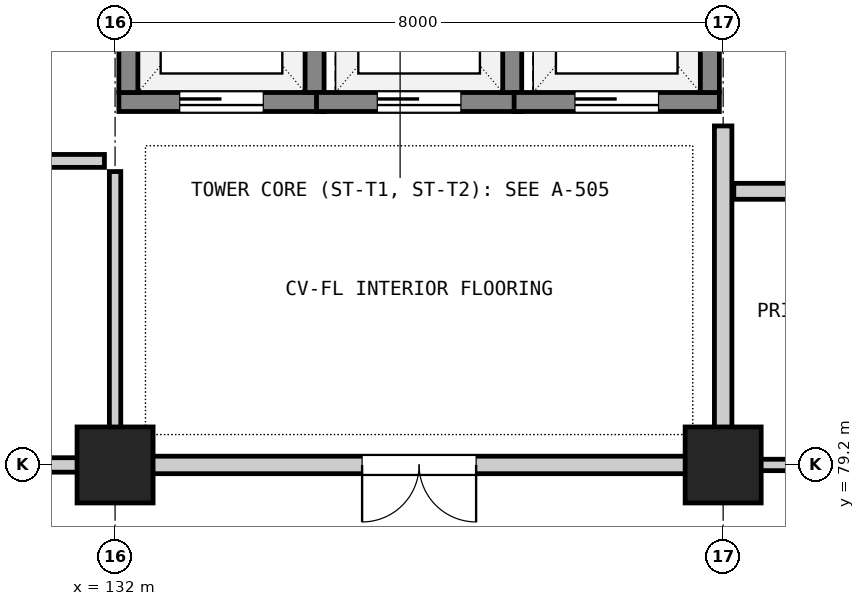
"""IFC4 building model, lengths in metres.
Left out: names, types, materials, properties, quantities, classifications, styles, units other than length and angle.
Written with IfcOpenShell. Run it as: python <this file> out.ifc"""

import sys

from ifc_helpers import new_model, si_unit, direction, frame, frame_2d, origin, origin_2d, place, context, subcontext, project, spatial, rectangle, extrude, element, fill, save


model = new_model("IFC4")
c1 = context("Model", 3, precision=1e-05, world=origin(), true_north=direction((0.0, 1.0)))
c2 = subcontext(c1, "Body", "Model", "MODEL_VIEW")
j1 = project(units=[si_unit("LENGTHUNIT", "METRE"), si_unit("PLANEANGLEUNIT", "RADIAN")], contexts=[c1])
p1 = place(None, origin())
s1 = spatial("IfcSite", under=j1, at=p1, CompositionType="ELEMENT")
p2 = place(p1, origin())
s2 = spatial("IfcBuilding", under=s1, at=p2, CompositionType="ELEMENT")
p3 = place(p2, frame((0.0, 0.0, 5.4)))
s3 = spatial("IfcBuildingStorey", under=s2, at=p3, CompositionType="ELEMENT", Elevation=5.4)
for number, where, z_axis, x_axis in (
    (1, (132.0, 79.2, 0.0), (0.0, 0.0, 1.0), (1.0, 0.0, 0.0)),
    (2, (140.0, 79.2, 0.0), (0.0, 0.0, 1.0), (1.0, 0.0, 0.0)),
):
    element("IfcColumn", number, at=place(p3, frame(where, z_axis=z_axis, x_axis=x_axis)), inside=s3, PredefinedType="COLUMN", context=c2, shape_type="SweptSolid", body=[
        extrude(rectangle(XDim=1.0, YDim=1.0, at=origin_2d()), origin(), (0.0, 0.0, 1.0), 5.4),
    ])
p4 = place(p3, frame((132.05, 83.975, 0.0), z_axis=(0.0, 0.0, 1.0), x_axis=(1.0, 0.0, 0.0)))
e3 = element("IfcWall", 3, at=p4, inside=s3, PredefinedType="SHEAR", context=c2, shape_type="SweptSolid", body=[
    extrude(rectangle(XDim=2.7, YDim=0.25, at=frame_2d((1.35, 0.0))), origin(), (0.0, 0.0, 1.0), 5.1),
])
p5 = place(p4, frame((0.8, 0.0, 0.0)))
e4 = element("IfcOpeningElement", 4, at=p5, cuts=e3, PredefinedType="OPENING", context=c2, shape_type="SweptSolid", body=[
    extrude(rectangle(XDim=1.1, YDim=2.15, at=frame_2d((0.55, 1.075))), frame((0.0, 0.137, 0.0), z_axis=(0.0, -1.0, 0.0), x_axis=(1.0, 0.0, 0.0)), (0.0, 0.0, 1.0), 0.274),
])
for number, where, z_axis, x_axis in (
    (5, (132.175, 84.1, 0.0), (0.0, 0.0, 1.0), (0.0, 1.0, 0.0)),
    (6, (134.625, 84.1, 0.0), (0.0, 0.0, 1.0), (0.0, 1.0, 0.0)),
):
    element("IfcWall", number, at=place(p3, frame(where, z_axis=z_axis, x_axis=x_axis)), inside=s3, PredefinedType="SHEAR", context=c2, shape_type="SweptSolid", body=[
        extrude(rectangle(XDim=2.6, YDim=0.25, at=frame_2d((1.3, 0.0))), origin(), (0.0, 0.0, 1.0), 5.1),
    ])
p6 = place(p3, frame((134.65, 83.975, 0.0), z_axis=(0.0, 0.0, 1.0), x_axis=(1.0, 0.0, 0.0)))
e7 = element("IfcWall", 7, at=p6, inside=s3, PredefinedType="SHEAR", context=c2, shape_type="SweptSolid", body=[
    extrude(rectangle(XDim=2.7, YDim=0.25, at=frame_2d((1.35, 0.0))), origin(), (0.0, 0.0, 1.0), 5.1),
])
p7 = place(p6, frame((0.8, 0.0, 0.0)))
e8 = element("IfcOpeningElement", 8, at=p7, cuts=e7, PredefinedType="OPENING", context=c2, shape_type="SweptSolid", body=[
    extrude(rectangle(XDim=1.1, YDim=2.15, at=frame_2d((0.55, 1.075))), frame((0.0, 0.137, 0.0), z_axis=(0.0, -1.0, 0.0), x_axis=(1.0, 0.0, 0.0)), (0.0, 0.0, 1.0), 0.274),
])
p8 = place(p3, frame((137.225, 84.1, 0.0), z_axis=(0.0, 0.0, 1.0), x_axis=(0.0, 1.0, 0.0)))
e9 = element("IfcWall", 9, at=p8, inside=s3, PredefinedType="SHEAR", context=c2, shape_type="SweptSolid", body=[
    extrude(rectangle(XDim=2.6, YDim=0.25, at=frame_2d((1.3, 0.0))), origin(), (0.0, 0.0, 1.0), 5.1),
])
p9 = place(p3, frame((137.25, 83.975, 0.0), z_axis=(0.0, 0.0, 1.0), x_axis=(1.0, 0.0, 0.0)))
e10 = element("IfcWall", 10, at=p9, inside=s3, PredefinedType="SHEAR", context=c2, shape_type="SweptSolid", body=[
    extrude(rectangle(XDim=2.7, YDim=0.25, at=frame_2d((1.35, 0.0))), origin(), (0.0, 0.0, 1.0), 5.1),
])
p10 = place(p9, frame((0.8, 0.0, 0.0)))
e11 = element("IfcOpeningElement", 11, at=p10, cuts=e10, PredefinedType="OPENING", context=c2, shape_type="SweptSolid", body=[
    extrude(rectangle(XDim=1.1, YDim=2.15, at=frame_2d((0.55, 1.075))), frame((0.0, 0.137, 0.0), z_axis=(0.0, -1.0, 0.0), x_axis=(1.0, 0.0, 0.0)), (0.0, 0.0, 1.0), 0.274),
])
p11 = place(p3, frame((139.825, 84.1, 0.0), z_axis=(0.0, 0.0, 1.0), x_axis=(0.0, 1.0, 0.0)))
e12 = element("IfcWall", 12, at=p11, inside=s3, PredefinedType="SHEAR", context=c2, shape_type="SweptSolid", body=[
    extrude(rectangle(XDim=2.6, YDim=0.25, at=frame_2d((1.3, 0.0))), origin(), (0.0, 0.0, 1.0), 5.1),
])
p12 = place(p3, frame((128.34, 79.2, 0.0), z_axis=(0.0, 0.0, 1.0), x_axis=(1.0, 0.0, 0.0)))
e13 = element("IfcWall", 13, at=p12, inside=s3, PredefinedType="PARTITIONING", context=c2, shape_type="SweptSolid", body=[
    extrude(rectangle(XDim=3.52, YDim=0.19, at=frame_2d((1.76, 0.0))), origin(), (0.0, 0.0, 1.0), 4.435),
])
p13 = place(p12, frame((1.235, 0.0, 0.0)))
e14 = element("IfcOpeningElement", 14, at=p13, cuts=e13, PredefinedType="OPENING", context=c2, shape_type="SweptSolid", body=[
    extrude(rectangle(XDim=1.05, YDim=2.15, at=frame_2d((0.525, 1.075))), frame((0.0, 0.107, 0.0), z_axis=(0.0, -1.0, 0.0), x_axis=(1.0, 0.0, 0.0)), (0.0, 0.0, 1.0), 0.214),
])
p14 = place(p3, frame((128.34, 83.2, 0.0), z_axis=(0.0, 0.0, 1.0), x_axis=(1.0, 0.0, 0.0)))
e15 = element("IfcWall", 15, at=p14, inside=s3, PredefinedType="PARTITIONING", context=c2, shape_type="SweptSolid", body=[
    extrude(rectangle(XDim=3.52, YDim=0.17, at=frame_2d((1.76, 0.0))), origin(), (0.0, 0.0, 1.0), 5.1),
])
p15 = place(p3, frame((132.0, 79.34, 0.0), z_axis=(0.0, 0.0, 1.0), x_axis=(0.0, 1.0, 0.0)))
e16 = element("IfcWall", 16, at=p15, inside=s3, PredefinedType="PARTITIONING", context=c2, shape_type="SweptSolid", body=[
    extrude(rectangle(XDim=3.72, YDim=0.15, at=frame_2d((1.86, 0.0))), origin(), (0.0, 0.0, 1.0), 4.485),
])
p16 = place(p3, frame((132.14, 79.2, 0.0), z_axis=(0.0, 0.0, 1.0), x_axis=(1.0, 0.0, 0.0)))
e17 = element("IfcWall", 17, at=p16, inside=s3, PredefinedType="SOLIDWALL", context=c2, shape_type="SweptSolid", body=[
    extrude(rectangle(XDim=7.72, YDim=0.23, at=frame_2d((3.86, 0.0))), origin(), (0.0, 0.0, 1.0), 4.485),
])
p17 = place(p16, frame((3.11, 0.0, 0.0)))
e18 = element("IfcOpeningElement", 18, at=p17, cuts=e17, PredefinedType="OPENING", context=c2, shape_type="SweptSolid", body=[
    extrude(rectangle(XDim=1.5, YDim=2.2, at=frame_2d((0.75, 1.1))), frame((0.0, 0.127, 0.0), z_axis=(0.0, -1.0, 0.0), x_axis=(1.0, 0.0, 0.0)), (0.0, 0.0, 1.0), 0.254),
])
p18 = place(p3, frame((140.0, 79.34, 0.0), z_axis=(0.0, 0.0, 1.0), x_axis=(0.0, 1.0, 0.0)))
e19 = element("IfcWall", 19, at=p18, inside=s3, PredefinedType="SOLIDWALL", context=c2, shape_type="SweptSolid", body=[
    extrude(rectangle(XDim=4.32, YDim=0.23, at=frame_2d((2.16, 0.0))), origin(), (0.0, 0.0, 1.0), 4.435),
])
p19 = place(p3, frame((140.14, 82.8, 0.0), z_axis=(0.0, 0.0, 1.0), x_axis=(1.0, 0.0, 0.0)))
e20 = element("IfcWall", 20, at=p19, inside=s3, PredefinedType="SOLIDWALL", context=c2, shape_type="SweptSolid", body=[
    extrude(rectangle(XDim=7.72, YDim=0.21, at=frame_2d((3.86, 0.0))), origin(), (0.0, 0.0, 1.0), 5.1),
])
p20 = place(p3, frame((140.14, 79.2, 0.0), z_axis=(0.0, 0.0, 1.0), x_axis=(1.0, 0.0, 0.0)))
e21 = element("IfcWall", 21, at=p20, inside=s3, PredefinedType="PARTITIONING", context=c2, shape_type="SweptSolid", body=[
    extrude(rectangle(XDim=7.72, YDim=0.15, at=frame_2d((3.86, 0.0))), origin(), (0.0, 0.0, 1.0), 4.535),
])
p21 = place(p20, frame((3.36, 0.0, 0.0)))
e22 = element("IfcOpeningElement", 22, at=p21, cuts=e21, PredefinedType="OPENING", context=c2, shape_type="SweptSolid", body=[
    extrude(rectangle(XDim=1.0, YDim=2.15, at=frame_2d((0.5, 1.075))), frame((0.0, 0.087, 0.0), z_axis=(0.0, -1.0, 0.0), x_axis=(1.0, 0.0, 0.0)), (0.0, 0.0, 1.0), 0.174),
])
p22 = place(p5, origin())
e23 = element("IfcDoor", 23, at=p22, inside=s3, OperationType="SLIDING_TO_LEFT", PredefinedType="DOOR", context=c2, shape_type="SweptSolid", body=[
    extrude(rectangle(XDim=1.1, YDim=2.15, at=frame_2d((0.55, 1.075))), frame((0.0, 0.025, 0.0), z_axis=(0.0, -1.0, 0.0), x_axis=(1.0, 0.0, 0.0)), (0.0, 0.0, 1.0), 0.05),
])
fill(e4, e23)
p23 = place(p7, origin())
e24 = element("IfcDoor", 24, at=p23, inside=s3, OperationType="SLIDING_TO_LEFT", PredefinedType="DOOR", context=c2, shape_type="SweptSolid", body=[
    extrude(rectangle(XDim=1.1, YDim=2.15, at=frame_2d((0.55, 1.075))), frame((0.0, 0.025, 0.0), z_axis=(0.0, -1.0, 0.0), x_axis=(1.0, 0.0, 0.0)), (0.0, 0.0, 1.0), 0.05),
])
fill(e8, e24)
p24 = place(p10, origin())
e25 = element("IfcDoor", 25, at=p24, inside=s3, OperationType="SLIDING_TO_LEFT", PredefinedType="DOOR", context=c2, shape_type="SweptSolid", body=[
    extrude(rectangle(XDim=1.1, YDim=2.15, at=frame_2d((0.55, 1.075))), frame((0.0, 0.025, 0.0), z_axis=(0.0, -1.0, 0.0), x_axis=(1.0, 0.0, 0.0)), (0.0, 0.0, 1.0), 0.05),
])
fill(e11, e25)
p25 = place(p17, frame((1.5, 0.0, 0.0), z_axis=(0.0, 0.0, 1.0), x_axis=(-1.0, 0.0, 0.0)))
e26 = element("IfcDoor", 26, at=p25, inside=s3, OperationType="DOUBLE_DOOR_SINGLE_SWING", PredefinedType="DOOR", context=c2, shape_type="SweptSolid", body=[
    extrude(rectangle(XDim=1.5, YDim=2.2, at=frame_2d((0.75, 1.1))), frame((0.0, 0.025, 0.0), z_axis=(0.0, -1.0, 0.0), x_axis=(1.0, 0.0, 0.0)), (0.0, 0.0, 1.0), 0.05),
])
fill(e18, e26)
save(model, sys.argv[1])
